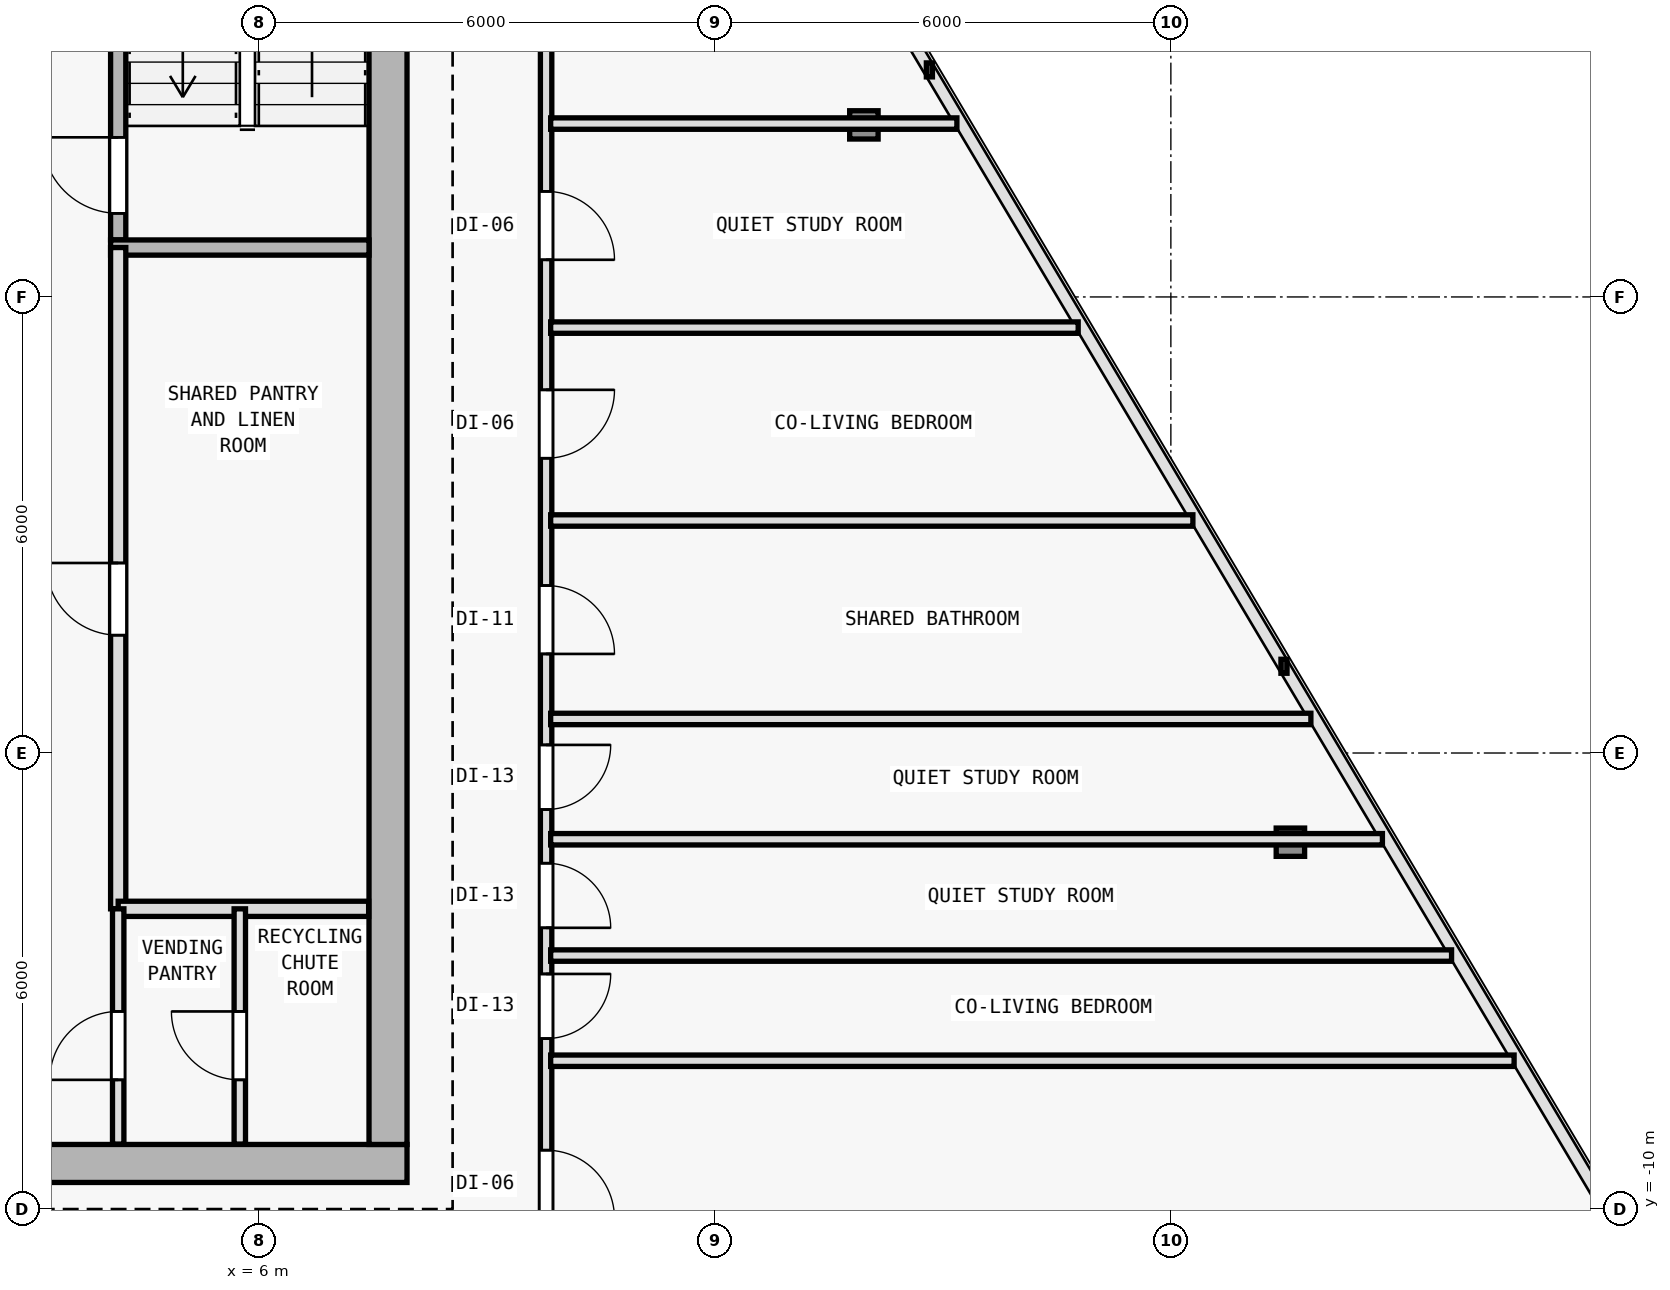
"""IFC4 building model, lengths in metres.
Left out: names, types, materials, properties, quantities, classifications, styles, units other than length and angle.
Written with IfcOpenShell. Run it as: python <this file> out.ifc"""

import sys

from ifc_helpers import new_model, si_unit, direction, frame, frame_2d, origin, origin_2d, place, context, subcontext, project, spatial, rectangle, i_section, extrude, element, fill, save


model = new_model("IFC4")
c1 = context("Model", 3, precision=1e-05, world=origin(), true_north=direction((0.0, 1.0)))
c2 = subcontext(c1, "Body", "Model", "MODEL_VIEW")
j1 = project(units=[si_unit("LENGTHUNIT", "METRE"), si_unit("PLANEANGLEUNIT", "RADIAN")], contexts=[c1])
p1 = place(None, origin())
s1 = spatial("IfcSite", under=j1, at=p1, CompositionType="ELEMENT")
p2 = place(p1, origin())
s2 = spatial("IfcBuilding", under=s1, at=p2, CompositionType="ELEMENT")
p3 = place(p2, frame((0.0, 0.0, 250.8)))
s3 = spatial("IfcBuildingStorey", under=s2, at=p3, CompositionType="ELEMENT", Elevation=250.8)
for number, where, z_axis, x_axis in (
    (1, (7.7, -9.4, 0.0), (0.0, 0.0, 1.0), (1.0, 0.0, 0.0)),
    (2, (7.7, 0.4, 0.0), (0.0, 0.0, 1.0), (1.0, 0.0, 0.0)),
):
    element("IfcColumn", number, at=place(p3, frame(where, z_axis=z_axis, x_axis=x_axis)), inside=s3, PredefinedType="COLUMN", context=c2, shape_type="SweptSolid", body=[
        extrude(i_section(OverallWidth=0.374, OverallDepth=0.372, WebThickness=0.012, FlangeThickness=0.02, FilletRadius=0.015, at=origin_2d()), origin(), (0.0, 0.0, 1.0), 3.6),
    ])
p4 = place(p3, frame((19.573, -5.174, 0.005), z_axis=(-0.026105663043, 0.021618752208, 0.999425396871), x_axis=(-0.637813971185, -0.770190455771, 0.0)))
e3 = element("IfcColumn", 3, at=p4, inside=s3, PredefinedType="COLUMN", context=c2, shape_type="SweptSolid", body=[
    extrude(i_section(OverallWidth=0.374, OverallDepth=0.372, WebThickness=0.012, FlangeThickness=0.02, FilletRadius=0.015, at=origin_2d()), origin(), (0.0, 0.0, 1.0), 3.591),
])
p5 = place(p3, frame((13.961, 4.264, 0.005), z_axis=(-0.018906028715, 0.009589028952, 0.999775281052), x_axis=(-0.452339157861, -0.891845999187, 0.0)))
e4 = element("IfcColumn", 4, at=p5, inside=s3, PredefinedType="COLUMN", context=c2, shape_type="SweptSolid", body=[
    extrude(i_section(OverallWidth=0.374, OverallDepth=0.372, WebThickness=0.012, FlangeThickness=0.02, FilletRadius=0.015, at=origin_2d()), origin(), (0.0, 0.0, 1.0), 3.59),
])
p6 = place(p3, frame((-7.95, -9.4, 0.0), z_axis=(0.0, 0.0, 1.0), x_axis=(1.0, 0.0, 0.0)))
e5 = element("IfcWall", 5, at=p6, inside=s3, PredefinedType="SHEAR", context=c2, shape_type="SweptSolid", body=[
    extrude(rectangle(XDim=15.9, YDim=0.5, at=frame_2d((7.95, 0.0))), origin(), (0.0, 0.0, 1.0), 3.35),
])
p7 = place(p6, frame((9.6, 0.0, 0.0)))
e6 = element("IfcOpeningElement", 6, at=p7, cuts=e5, PredefinedType="OPENING", context=c2, shape_type="SweptSolid", body=[
    extrude(rectangle(XDim=1.5, YDim=2.2, at=frame_2d((0.75, 1.1))), frame((0.0, 0.26, 0.0), z_axis=(0.0, -1.0, 0.0), x_axis=(1.0, 0.0, 0.0)), (0.0, 0.0, 1.0), 0.52),
])
p8 = place(p3, frame((7.7, 9.95, 0.0), z_axis=(0.0, 0.0, 1.0), x_axis=(0.0, -1.0, 0.0)))
e7 = element("IfcWall", 7, at=p8, inside=s3, PredefinedType="SHEAR", context=c2, shape_type="SweptSolid", body=[
    extrude(rectangle(XDim=19.1, YDim=0.5, at=frame_2d((9.55, 0.0))), origin(), (0.0, 0.0, 1.0), 3.35),
])
p9 = place(p3, frame((4.15, 2.75, 0.0), z_axis=(0.0, 0.0, 1.0), x_axis=(0.0, 1.0, 0.0)))
e8 = element("IfcWall", 8, at=p9, inside=s3, PredefinedType="SOLIDWALL", context=c2, shape_type="SweptSolid", body=[
    extrude(rectangle(XDim=7.2, YDim=0.2, at=frame_2d((3.6, 0.0))), origin(), (0.0, 0.0, 1.0), 3.35),
])
p10 = place(p9, frame((0.35, 0.0, 0.0)))
e9 = element("IfcOpeningElement", 9, at=p10, cuts=e8, PredefinedType="OPENING", context=c2, shape_type="SweptSolid", body=[
    extrude(rectangle(XDim=1.0, YDim=2.15, at=frame_2d((0.5, 1.075))), frame((0.0, 0.11, 0.0), z_axis=(0.0, -1.0, 0.0), x_axis=(1.0, 0.0, 0.0)), (0.0, 0.0, 1.0), 0.22),
])
p11 = place(p3, frame((4.05, 2.65, 0.0), z_axis=(0.0, 0.0, 1.0), x_axis=(1.0, 0.0, 0.0)))
e10 = element("IfcWall", 10, at=p11, inside=s3, PredefinedType="SOLIDWALL", context=c2, shape_type="SweptSolid", body=[
    extrude(rectangle(XDim=3.4, YDim=0.2, at=frame_2d((1.7, 0.0))), origin(), (0.0, 0.0, 1.0), 3.35),
])
p12 = place(p3, frame((4.15, -6.05, 0.0), z_axis=(0.0, 0.0, 1.0), x_axis=(0.0, 1.0, 0.0)))
e11 = element("IfcWall", 11, at=p12, inside=s3, PredefinedType="SOLIDWALL", context=c2, shape_type="SweptSolid", body=[
    extrude(rectangle(XDim=8.7, YDim=0.2, at=frame_2d((4.35, 0.0))), origin(), (0.0, 0.0, 1.0), 3.35),
])
p13 = place(p12, frame((3.6, 0.0, 0.0)))
e12 = element("IfcOpeningElement", 12, at=p13, cuts=e11, PredefinedType="OPENING", context=c2, shape_type="SweptSolid", body=[
    extrude(rectangle(XDim=0.95, YDim=2.1, at=frame_2d((0.475, 1.05))), frame((0.0, 0.11, 0.0), z_axis=(0.0, -1.0, 0.0), x_axis=(1.0, 0.0, 0.0)), (0.0, 0.0, 1.0), 0.22),
])
p14 = place(p3, frame((4.15, -6.05, 0.0), z_axis=(0.0, 0.0, 1.0), x_axis=(1.0, 0.0, 0.0)))
e13 = element("IfcWall", 13, at=p14, inside=s3, PredefinedType="SOLIDWALL", context=c2, shape_type="SweptSolid", body=[
    extrude(rectangle(XDim=3.295, YDim=0.2, at=frame_2d((1.647, 0.0))), origin(), (0.0, 0.0, 1.0), 3.35),
])
p15 = place(p3, frame((4.15, -9.145, 0.0), z_axis=(0.0, 0.0, 1.0), x_axis=(0.0, 1.0, 0.0)))
e14 = element("IfcWall", 14, at=p15, inside=s3, PredefinedType="PARTITIONING", context=c2, shape_type="SweptSolid", body=[
    extrude(rectangle(XDim=3.095, YDim=0.15, at=frame_2d((1.547, 0.0))), origin(), (0.0, 0.0, 1.0), 3.35),
])
p16 = place(p15, frame((0.845, 0.0, 0.0)))
e15 = element("IfcOpeningElement", 15, at=p16, cuts=e14, PredefinedType="OPENING", context=c2, shape_type="SweptSolid", body=[
    extrude(rectangle(XDim=0.9, YDim=2.1, at=frame_2d((0.45, 1.05))), frame((0.0, 0.085, 0.0), z_axis=(0.0, -1.0, 0.0), x_axis=(1.0, 0.0, 0.0)), (0.0, 0.0, 1.0), 0.17),
])
p17 = place(p3, frame((5.75, -9.145, 0.0), z_axis=(0.0, 0.0, 1.0), x_axis=(0.0, 1.0, 0.0)))
e16 = element("IfcWall", 16, at=p17, inside=s3, PredefinedType="PARTITIONING", context=c2, shape_type="SweptSolid", body=[
    extrude(rectangle(XDim=3.095, YDim=0.15, at=frame_2d((1.547, 0.0))), origin(), (0.0, 0.0, 1.0), 3.35),
])
p18 = place(p17, frame((0.845, 0.0, 0.0)))
e17 = element("IfcOpeningElement", 17, at=p18, cuts=e16, PredefinedType="OPENING", context=c2, shape_type="SweptSolid", body=[
    extrude(rectangle(XDim=0.9, YDim=2.1, at=frame_2d((0.45, 1.05))), frame((0.0, 0.085, 0.0), z_axis=(0.0, -1.0, 0.0), x_axis=(1.0, 0.0, 0.0)), (0.0, 0.0, 1.0), 0.17),
])
p19 = place(p3, frame((9.78, 8.226, 0.0), z_axis=(0.0, 0.0, 1.0), x_axis=(0.0, -1.0, 0.0)))
e18 = element("IfcWall", 18, at=p19, inside=s3, PredefinedType="PARTITIONING", context=c2, shape_type="SweptSolid", body=[
    extrude(rectangle(XDim=19.706, YDim=0.15, at=frame_2d((9.853, 0.0))), origin(), (0.0, 0.0, 1.0), 2.775),
])
p20 = place(p19, frame((17.451, 0.0, 0.0)))
e19 = element("IfcOpeningElement", 19, at=p20, cuts=e18, PredefinedType="OPENING", context=c2, shape_type="SweptSolid", body=[
    extrude(rectangle(XDim=0.9, YDim=2.1, at=frame_2d((0.45, 1.05))), frame((0.0, 0.085, 0.0), z_axis=(0.0, -1.0, 0.0), x_axis=(1.0, 0.0, 0.0)), (0.0, 0.0, 1.0), 0.17),
])
p21 = place(p19, frame((15.133, 0.0, 0.0)))
e20 = element("IfcOpeningElement", 20, at=p21, cuts=e18, PredefinedType="OPENING", context=c2, shape_type="SweptSolid", body=[
    extrude(rectangle(XDim=0.85, YDim=2.1, at=frame_2d((0.425, 1.05))), frame((0.0, 0.085, 0.0), z_axis=(0.0, -1.0, 0.0), x_axis=(1.0, 0.0, 0.0)), (0.0, 0.0, 1.0), 0.17),
])
p22 = place(p19, frame((13.676, 0.0, 0.0)))
e21 = element("IfcOpeningElement", 21, at=p22, cuts=e18, PredefinedType="OPENING", context=c2, shape_type="SweptSolid", body=[
    extrude(rectangle(XDim=0.85, YDim=2.1, at=frame_2d((0.425, 1.05))), frame((0.0, 0.085, 0.0), z_axis=(0.0, -1.0, 0.0), x_axis=(1.0, 0.0, 0.0)), (0.0, 0.0, 1.0), 0.17),
])
p23 = place(p19, frame((12.119, 0.0, 0.0)))
e22 = element("IfcOpeningElement", 22, at=p23, cuts=e18, PredefinedType="OPENING", context=c2, shape_type="SweptSolid", body=[
    extrude(rectangle(XDim=0.85, YDim=2.1, at=frame_2d((0.425, 1.05))), frame((0.0, 0.085, 0.0), z_axis=(0.0, -1.0, 0.0), x_axis=(1.0, 0.0, 0.0)), (0.0, 0.0, 1.0), 0.17),
])
p24 = place(p19, frame((10.022, 0.0, 0.0)))
e23 = element("IfcOpeningElement", 23, at=p24, cuts=e18, PredefinedType="OPENING", context=c2, shape_type="SweptSolid", body=[
    extrude(rectangle(XDim=0.9, YDim=2.1, at=frame_2d((0.45, 1.05))), frame((0.0, 0.085, 0.0), z_axis=(0.0, -1.0, 0.0), x_axis=(1.0, 0.0, 0.0)), (0.0, 0.0, 1.0), 0.17),
])
p25 = place(p19, frame((7.448, 0.0, 0.0)))
e24 = element("IfcOpeningElement", 24, at=p25, cuts=e18, PredefinedType="OPENING", context=c2, shape_type="SweptSolid", body=[
    extrude(rectangle(XDim=0.9, YDim=2.1, at=frame_2d((0.45, 1.05))), frame((0.0, 0.085, 0.0), z_axis=(0.0, -1.0, 0.0), x_axis=(1.0, 0.0, 0.0)), (0.0, 0.0, 1.0), 0.17),
])
p26 = place(p19, frame((4.837, 0.0, 0.0)))
e25 = element("IfcOpeningElement", 25, at=p26, cuts=e18, PredefinedType="OPENING", context=c2, shape_type="SweptSolid", body=[
    extrude(rectangle(XDim=0.9, YDim=2.1, at=frame_2d((0.45, 1.05))), frame((0.0, 0.085, 0.0), z_axis=(0.0, -1.0, 0.0), x_axis=(1.0, 0.0, 0.0)), (0.0, 0.0, 1.0), 0.17),
])
p27 = place(p3, frame((9.84, -5.135, 0.0), z_axis=(0.0, 0.0, 1.0), x_axis=(1.0, 0.0, 0.0)))
e26 = element("IfcWall", 26, at=p27, inside=s3, PredefinedType="PARTITIONING", context=c2, shape_type="SweptSolid", body=[
    extrude(rectangle(XDim=10.943, YDim=0.15, at=frame_2d((5.472, 0.0))), origin(), (0.0, 0.0, 1.0), 2.725),
])
p28 = place(p3, frame((9.84, 4.281, 0.0), z_axis=(0.0, 0.0, 1.0), x_axis=(1.0, 0.0, 0.0)))
e27 = element("IfcWall", 27, at=p28, inside=s3, PredefinedType="PARTITIONING", context=c2, shape_type="SweptSolid", body=[
    extrude(rectangle(XDim=5.345, YDim=0.15, at=frame_2d((2.672, 0.0))), origin(), (0.0, 0.0, 1.0), 2.775),
])
p29 = place(p3, frame((9.84, -8.049, 0.0), z_axis=(0.0, 0.0, 1.0), x_axis=(1.0, 0.0, 0.0)))
e28 = element("IfcWall", 28, at=p29, inside=s3, PredefinedType="PARTITIONING", context=c2, shape_type="SweptSolid", body=[
    extrude(rectangle(XDim=12.676, YDim=0.15, at=frame_2d((6.338, 0.0))), origin(), (0.0, 0.0, 1.0), 2.825),
])
p30 = place(p3, frame((9.84, -0.941, 0.0), z_axis=(0.0, 0.0, 1.0), x_axis=(1.0, 0.0, 0.0)))
e29 = element("IfcWall", 29, at=p30, inside=s3, PredefinedType="PARTITIONING", context=c2, shape_type="SweptSolid", body=[
    extrude(rectangle(XDim=8.45, YDim=0.15, at=frame_2d((4.225, 0.0))), origin(), (0.0, 0.0, 1.0), 2.725),
])
p31 = place(p3, frame((9.84, -6.665, 0.0), z_axis=(0.0, 0.0, 1.0), x_axis=(1.0, 0.0, 0.0)))
e30 = element("IfcWall", 30, at=p31, inside=s3, PredefinedType="PARTITIONING", context=c2, shape_type="SweptSolid", body=[
    extrude(rectangle(XDim=11.853, YDim=0.15, at=frame_2d((5.927, 0.0))), origin(), (0.0, 0.0, 1.0), 2.725),
])
p32 = place(p3, frame((9.84, -3.552, 0.0), z_axis=(0.0, 0.0, 1.0), x_axis=(1.0, 0.0, 0.0)))
e31 = element("IfcWall", 31, at=p32, inside=s3, PredefinedType="PARTITIONING", context=c2, shape_type="SweptSolid", body=[
    extrude(rectangle(XDim=10.002, YDim=0.15, at=frame_2d((5.001, 0.0))), origin(), (0.0, 0.0, 1.0), 2.725),
])
p33 = place(p3, frame((9.84, 1.597, 0.0), z_axis=(0.0, 0.0, 1.0), x_axis=(1.0, 0.0, 0.0)))
e32 = element("IfcWall", 32, at=p33, inside=s3, PredefinedType="PARTITIONING", context=c2, shape_type="SweptSolid", body=[
    extrude(rectangle(XDim=6.941, YDim=0.15, at=frame_2d((3.47, 0.0))), origin(), (0.0, 0.0, 1.0), 2.725),
])
p34 = place(p10, origin())
e33 = element("IfcDoor", 33, at=p34, inside=s3, OperationType="SINGLE_SWING_RIGHT", PredefinedType="DOOR", context=c2, shape_type="SweptSolid", body=[
    extrude(rectangle(XDim=1.0, YDim=2.15, at=frame_2d((0.5, 1.075))), frame((0.0, 0.025, 0.0), z_axis=(0.0, -1.0, 0.0), x_axis=(1.0, 0.0, 0.0)), (0.0, 0.0, 1.0), 0.05),
])
fill(e9, e33)
p35 = place(p13, origin())
e34 = element("IfcDoor", 34, at=p35, inside=s3, OperationType="SINGLE_SWING_RIGHT", PredefinedType="DOOR", context=c2, shape_type="SweptSolid", body=[
    extrude(rectangle(XDim=0.95, YDim=2.1, at=frame_2d((0.475, 1.05))), frame((0.0, 0.025, 0.0), z_axis=(0.0, -1.0, 0.0), x_axis=(1.0, 0.0, 0.0)), (0.0, 0.0, 1.0), 0.05),
])
fill(e12, e34)
p36 = place(p16, origin())
e35 = element("IfcDoor", 35, at=p36, inside=s3, OperationType="SINGLE_SWING_LEFT", PredefinedType="DOOR", context=c2, shape_type="SweptSolid", body=[
    extrude(rectangle(XDim=0.9, YDim=2.1, at=frame_2d((0.45, 1.05))), frame((0.0, 0.025, 0.0), z_axis=(0.0, -1.0, 0.0), x_axis=(1.0, 0.0, 0.0)), (0.0, 0.0, 1.0), 0.05),
])
fill(e15, e35)
p37 = place(p18, origin())
e36 = element("IfcDoor", 36, at=p37, inside=s3, OperationType="SINGLE_SWING_RIGHT", PredefinedType="DOOR", context=c2, shape_type="SweptSolid", body=[
    extrude(rectangle(XDim=0.9, YDim=2.1, at=frame_2d((0.45, 1.05))), frame((0.0, 0.025, 0.0), z_axis=(0.0, -1.0, 0.0), x_axis=(1.0, 0.0, 0.0)), (0.0, 0.0, 1.0), 0.05),
])
fill(e17, e36)
p38 = place(p20, origin())
e37 = element("IfcDoor", 37, at=p38, inside=s3, OperationType="SINGLE_SWING_RIGHT", PredefinedType="DOOR", context=c2, shape_type="SweptSolid", body=[
    extrude(rectangle(XDim=0.9, YDim=2.1, at=frame_2d((0.45, 1.05))), frame((0.0, 0.025, 0.0), z_axis=(0.0, -1.0, 0.0), x_axis=(1.0, 0.0, 0.0)), (0.0, 0.0, 1.0), 0.05),
])
fill(e19, e37)
p39 = place(p21, origin())
e38 = element("IfcDoor", 38, at=p39, inside=s3, OperationType="SINGLE_SWING_LEFT", PredefinedType="DOOR", context=c2, shape_type="SweptSolid", body=[
    extrude(rectangle(XDim=0.85, YDim=2.1, at=frame_2d((0.425, 1.05))), frame((0.0, 0.025, 0.0), z_axis=(0.0, -1.0, 0.0), x_axis=(1.0, 0.0, 0.0)), (0.0, 0.0, 1.0), 0.05),
])
fill(e20, e38)
p40 = place(p22, origin())
e39 = element("IfcDoor", 39, at=p40, inside=s3, OperationType="SINGLE_SWING_RIGHT", PredefinedType="DOOR", context=c2, shape_type="SweptSolid", body=[
    extrude(rectangle(XDim=0.85, YDim=2.1, at=frame_2d((0.425, 1.05))), frame((0.0, 0.025, 0.0), z_axis=(0.0, -1.0, 0.0), x_axis=(1.0, 0.0, 0.0)), (0.0, 0.0, 1.0), 0.05),
])
fill(e21, e39)
p41 = place(p23, origin())
e40 = element("IfcDoor", 40, at=p41, inside=s3, OperationType="SINGLE_SWING_LEFT", PredefinedType="DOOR", context=c2, shape_type="SweptSolid", body=[
    extrude(rectangle(XDim=0.85, YDim=2.1, at=frame_2d((0.425, 1.05))), frame((0.0, 0.025, 0.0), z_axis=(0.0, -1.0, 0.0), x_axis=(1.0, 0.0, 0.0)), (0.0, 0.0, 1.0), 0.05),
])
fill(e22, e40)
p42 = place(p24, origin())
e41 = element("IfcDoor", 41, at=p42, inside=s3, OperationType="SINGLE_SWING_RIGHT", PredefinedType="DOOR", context=c2, shape_type="SweptSolid", body=[
    extrude(rectangle(XDim=0.9, YDim=2.1, at=frame_2d((0.45, 1.05))), frame((0.0, 0.025, 0.0), z_axis=(0.0, -1.0, 0.0), x_axis=(1.0, 0.0, 0.0)), (0.0, 0.0, 1.0), 0.05),
])
fill(e23, e41)
p43 = place(p25, origin())
e42 = element("IfcDoor", 42, at=p43, inside=s3, OperationType="SINGLE_SWING_LEFT", PredefinedType="DOOR", context=c2, shape_type="SweptSolid", body=[
    extrude(rectangle(XDim=0.9, YDim=2.1, at=frame_2d((0.45, 1.05))), frame((0.0, 0.025, 0.0), z_axis=(0.0, -1.0, 0.0), x_axis=(1.0, 0.0, 0.0)), (0.0, 0.0, 1.0), 0.05),
])
fill(e24, e42)
p44 = place(p26, origin())
e43 = element("IfcDoor", 43, at=p44, inside=s3, OperationType="SINGLE_SWING_RIGHT", PredefinedType="DOOR", context=c2, shape_type="SweptSolid", body=[
    extrude(rectangle(XDim=0.9, YDim=2.1, at=frame_2d((0.45, 1.05))), frame((0.0, 0.025, 0.0), z_axis=(0.0, -1.0, 0.0), x_axis=(1.0, 0.0, 0.0)), (0.0, 0.0, 1.0), 0.05),
])
fill(e25, e43)
save(model, sys.argv[1])
